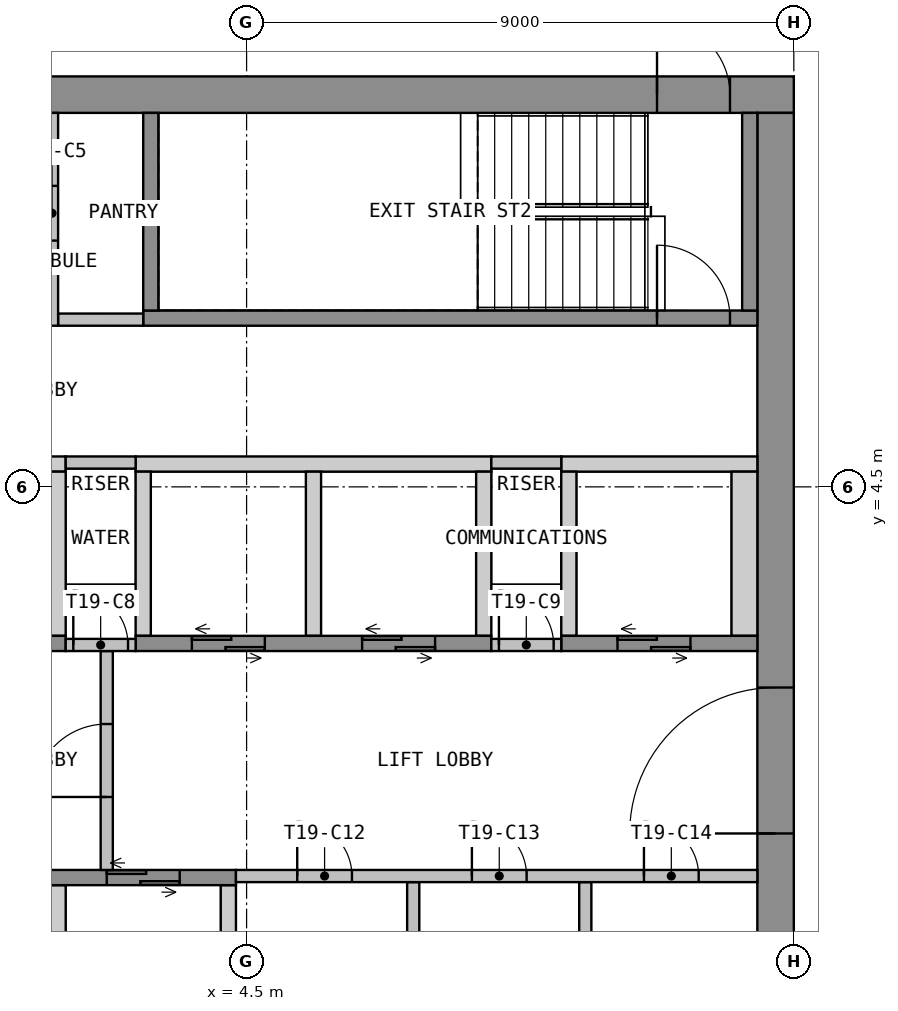
"""IFC4 building model, lengths in metres.
Left out: names, types, materials, properties, quantities, classifications, styles, units other than length and angle.
Written with IfcOpenShell. Run it as: python <this file> out.ifc"""

import sys

from ifc_helpers import new_model, si_unit, direction, frame, frame_2d, origin, place, context, subcontext, project, spatial, polyline, rectangle, outline, extrude, element, fill, save


model = new_model("IFC4")
c1 = context("Model", 3, precision=1e-05, world=origin(), true_north=direction((0.0, 1.0)))
c2 = subcontext(c1, "Body", "Model", "MODEL_VIEW")
j1 = project(units=[si_unit("LENGTHUNIT", "METRE"), si_unit("PLANEANGLEUNIT", "RADIAN")], contexts=[c1])
p1 = place(None, origin())
s1 = spatial("IfcSite", under=j1, at=p1, CompositionType="ELEMENT")
p2 = place(p1, origin())
s2 = spatial("IfcBuilding", under=s1, at=p2, CompositionType="ELEMENT")
p3 = place(p2, frame((0.0, 0.0, 258.6)))
s3 = spatial("IfcBuildingStorey", under=s2, at=p3, CompositionType="ELEMENT", Elevation=258.6)
p4 = place(p3, frame((-13.5, 10.95, 0.0), z_axis=(0.0, 0.0, 1.0), x_axis=(1.0, 0.0, 0.0)))
e1 = element("IfcWall", 1, at=p4, inside=s3, PredefinedType="SHEAR", context=c2, shape_type="SweptSolid", body=[
    extrude(rectangle(XDim=27.0, YDim=0.6, at=frame_2d((13.5, 0.0))), origin(), (0.0, 0.0, 1.0), 3.575),
])
p5 = place(p4, frame((12.3, 0.0, 0.0)))
e2 = element("IfcOpeningElement", 2, at=p5, cuts=e1, PredefinedType="OPENING", context=c2, shape_type="SweptSolid", body=[
    extrude(rectangle(XDim=2.4, YDim=2.1, at=frame_2d((1.2, 1.05))), frame((0.0, 0.31, 0.0), z_axis=(0.0, -1.0, 0.0), x_axis=(1.0, 0.0, 0.0)), (0.0, 0.0, 1.0), 0.62),
])
p6 = place(p4, frame((1.05, 0.0, 0.0)))
e3 = element("IfcOpeningElement", 3, at=p6, cuts=e1, PredefinedType="OPENING", context=c2, shape_type="SweptSolid", body=[
    extrude(rectangle(XDim=1.2, YDim=2.1, at=frame_2d((0.6, 1.05))), frame((0.0, 0.31, 0.0), z_axis=(0.0, -1.0, 0.0), x_axis=(1.0, 0.0, 0.0)), (0.0, 0.0, 1.0), 0.62),
])
p7 = place(p4, frame((24.75, 0.0, 0.0)))
e4 = element("IfcOpeningElement", 4, at=p7, cuts=e1, PredefinedType="OPENING", context=c2, shape_type="SweptSolid", body=[
    extrude(rectangle(XDim=1.2, YDim=2.1, at=frame_2d((0.6, 1.05))), frame((0.0, 0.31, 0.0), z_axis=(0.0, -1.0, 0.0), x_axis=(1.0, 0.0, 0.0)), (0.0, 0.0, 1.0), 0.62),
])
p8 = place(p3, frame((13.2, -10.65, 0.0), z_axis=(0.0, 0.0, 1.0), x_axis=(0.0, 1.0, 0.0)))
e5 = element("IfcWall", 5, at=p8, inside=s3, PredefinedType="SHEAR", context=c2, shape_type="SweptSolid", body=[
    extrude(rectangle(XDim=21.3, YDim=0.6, at=frame_2d((10.65, 0.0))), origin(), (0.0, 0.0, 1.0), 3.575),
])
p9 = place(p8, frame((9.45, 0.0, 0.0)))
e6 = element("IfcOpeningElement", 6, at=p9, cuts=e5, PredefinedType="OPENING", context=c2, shape_type="SweptSolid", body=[
    extrude(rectangle(XDim=2.4, YDim=2.1, at=frame_2d((1.2, 1.05))), frame((0.0, 0.31, 0.0), z_axis=(0.0, -1.0, 0.0), x_axis=(1.0, 0.0, 0.0)), (0.0, 0.0, 1.0), 0.62),
])
p10 = place(p3, origin())
e7 = element("IfcWall", 7, at=p10, inside=s3, PredefinedType="SHEAR", context=c2, shape_type="SweptSolid", body=[
    extrude(outline(polyline([(-1.525, 4.75), (1.525, 4.75), (1.525, 5.0), (-1.525, 5.0), (-1.525, 4.75)])), origin(), (0.0, 0.0, 1.0), 3.575),
])
p11 = place(p3, origin())
e8 = element("IfcWall", 8, at=p11, inside=s3, PredefinedType="SHEAR", context=c2, shape_type="SweptSolid", body=[
    extrude(outline(polyline([(2.675, 4.75), (8.525, 4.75), (8.525, 5.0), (2.675, 5.0), (2.675, 4.75)])), origin(), (0.0, 0.0, 1.0), 3.575),
])
p12 = place(p3, origin())
e9 = element("IfcWall", 9, at=p12, inside=s3, PredefinedType="SHEAR", context=c2, shape_type="SweptSolid", body=[
    extrude(outline(polyline([(9.675, 4.75), (12.9, 4.75), (12.9, 5.0), (9.675, 5.0), (9.675, 4.75)])), origin(), (0.0, 0.0, 1.0), 3.575),
])
p13 = place(p3, origin())
e10 = element("IfcWall", 10, at=p13, inside=s3, PredefinedType="SHEAR", context=c2, shape_type="SweptSolid", body=[
    extrude(outline(polyline([(1.275, 2.05), (1.525, 2.05), (1.525, 4.75), (1.275, 4.75), (1.275, 2.05)])), origin(), (0.0, 0.0, 1.0), 3.575),
])
p14 = place(p3, origin())
e11 = element("IfcWall", 11, at=p14, inside=s3, PredefinedType="SHEAR", context=c2, shape_type="SweptSolid", body=[
    extrude(outline(polyline([(2.675, 2.05), (2.925, 2.05), (2.925, 4.75), (2.675, 4.75), (2.675, 2.05)])), origin(), (0.0, 0.0, 1.0), 3.575),
])
p15 = place(p3, origin())
e12 = element("IfcWall", 12, at=p15, inside=s3, PredefinedType="SHEAR", context=c2, shape_type="SweptSolid", body=[
    extrude(outline(polyline([(5.475, 2.05), (5.725, 2.05), (5.725, 4.75), (5.475, 4.75), (5.475, 2.05)])), origin(), (0.0, 0.0, 1.0), 3.575),
])
p16 = place(p3, origin())
e13 = element("IfcWall", 13, at=p16, inside=s3, PredefinedType="SHEAR", context=c2, shape_type="SweptSolid", body=[
    extrude(outline(polyline([(8.275, 2.05), (8.525, 2.05), (8.525, 4.75), (8.275, 4.75), (8.275, 2.05)])), origin(), (0.0, 0.0, 1.0), 3.575),
])
p17 = place(p3, origin())
e14 = element("IfcWall", 14, at=p17, inside=s3, PredefinedType="SHEAR", context=c2, shape_type="SweptSolid", body=[
    extrude(outline(polyline([(9.675, 2.05), (9.925, 2.05), (9.925, 4.75), (9.675, 4.75), (9.675, 2.05)])), origin(), (0.0, 0.0, 1.0), 3.575),
])
p18 = place(p3, origin())
e15 = element("IfcWall", 15, at=p18, inside=s3, PredefinedType="SHEAR", context=c2, shape_type="SweptSolid", body=[
    extrude(outline(polyline([(12.475, 2.05), (12.9, 2.05), (12.9, 4.75), (12.475, 4.75), (12.475, 2.05)])), origin(), (0.0, 0.0, 1.0), 3.575),
])
p19 = place(p3, frame((-1.525, 1.925, 0.0), z_axis=(0.0, 0.0, 1.0), x_axis=(1.0, 0.0, 0.0)))
e16 = element("IfcWall", 16, at=p19, inside=s3, PredefinedType="SHEAR", context=c2, shape_type="SweptSolid", body=[
    extrude(rectangle(XDim=3.05, YDim=0.25, at=frame_2d((1.525, 0.0))), origin(), (0.0, 0.0, 1.0), 3.575),
])
p20 = place(p19, frame((0.925, 0.0, 0.0)))
e17 = element("IfcOpeningElement", 17, at=p20, cuts=e16, PredefinedType="OPENING", context=c2, shape_type="SweptSolid", body=[
    extrude(rectangle(XDim=1.2, YDim=2.1, at=frame_2d((0.6, 1.05))), frame((0.0, 0.135, 0.0), z_axis=(0.0, -1.0, 0.0), x_axis=(1.0, 0.0, 0.0)), (0.0, 0.0, 1.0), 0.27),
])
p21 = place(p3, frame((2.675, 1.925, 0.0), z_axis=(0.0, 0.0, 1.0), x_axis=(1.0, 0.0, 0.0)))
e18 = element("IfcWall", 18, at=p21, inside=s3, PredefinedType="SHEAR", context=c2, shape_type="SweptSolid", body=[
    extrude(rectangle(XDim=5.85, YDim=0.25, at=frame_2d((2.925, 0.0))), origin(), (0.0, 0.0, 1.0), 3.575),
])
p22 = place(p21, frame((0.925, 0.0, 0.0)))
e19 = element("IfcOpeningElement", 19, at=p22, cuts=e18, PredefinedType="OPENING", context=c2, shape_type="SweptSolid", body=[
    extrude(rectangle(XDim=1.2, YDim=2.1, at=frame_2d((0.6, 1.05))), frame((0.0, 0.135, 0.0), z_axis=(0.0, -1.0, 0.0), x_axis=(1.0, 0.0, 0.0)), (0.0, 0.0, 1.0), 0.27),
])
p23 = place(p21, frame((3.725, 0.0, 0.0)))
e20 = element("IfcOpeningElement", 20, at=p23, cuts=e18, PredefinedType="OPENING", context=c2, shape_type="SweptSolid", body=[
    extrude(rectangle(XDim=1.2, YDim=2.1, at=frame_2d((0.6, 1.05))), frame((0.0, 0.135, 0.0), z_axis=(0.0, -1.0, 0.0), x_axis=(1.0, 0.0, 0.0)), (0.0, 0.0, 1.0), 0.27),
])
p24 = place(p3, frame((9.675, 1.925, 0.0), z_axis=(0.0, 0.0, 1.0), x_axis=(1.0, 0.0, 0.0)))
e21 = element("IfcWall", 21, at=p24, inside=s3, PredefinedType="SHEAR", context=c2, shape_type="SweptSolid", body=[
    extrude(rectangle(XDim=3.225, YDim=0.25, at=frame_2d((1.612, 0.0))), origin(), (0.0, 0.0, 1.0), 3.575),
])
p25 = place(p24, frame((0.925, 0.0, 0.0)))
e22 = element("IfcOpeningElement", 22, at=p25, cuts=e21, PredefinedType="OPENING", context=c2, shape_type="SweptSolid", body=[
    extrude(rectangle(XDim=1.2, YDim=2.1, at=frame_2d((0.6, 1.05))), frame((0.0, 0.135, 0.0), z_axis=(0.0, -1.0, 0.0), x_axis=(1.0, 0.0, 0.0)), (0.0, 0.0, 1.0), 0.27),
])
p26 = place(p3, origin())
e23 = element("IfcWall", 23, at=p26, inside=s3, PredefinedType="SHEAR", context=c2, shape_type="SweptSolid", body=[
    extrude(outline(polyline([(1.275, -4.75), (1.525, -4.75), (1.525, -2.05), (1.275, -2.05), (1.275, -4.75)])), origin(), (0.0, 0.0, 1.0), 3.575),
])
p27 = place(p3, origin())
e24 = element("IfcWall", 24, at=p27, inside=s3, PredefinedType="SHEAR", context=c2, shape_type="SweptSolid", body=[
    extrude(outline(polyline([(4.075, -4.75), (4.325, -4.75), (4.325, -2.05), (4.075, -2.05), (4.075, -4.75)])), origin(), (0.0, 0.0, 1.0), 3.575),
])
p28 = place(p3, frame((-1.525, -1.925, 0.0), z_axis=(0.0, 0.0, 1.0), x_axis=(1.0, 0.0, 0.0)))
e25 = element("IfcWall", 25, at=p28, inside=s3, PredefinedType="SHEAR", context=c2, shape_type="SweptSolid", body=[
    extrude(rectangle(XDim=5.85, YDim=0.25, at=frame_2d((2.925, 0.0))), origin(), (0.0, 0.0, 1.0), 3.575),
])
p29 = place(p28, frame((0.925, 0.0, 0.0)))
e26 = element("IfcOpeningElement", 26, at=p29, cuts=e25, PredefinedType="OPENING", context=c2, shape_type="SweptSolid", body=[
    extrude(rectangle(XDim=1.2, YDim=2.1, at=frame_2d((0.6, 1.05))), frame((0.0, 0.135, 0.0), z_axis=(0.0, -1.0, 0.0), x_axis=(1.0, 0.0, 0.0)), (0.0, 0.0, 1.0), 0.27),
])
p30 = place(p28, frame((3.725, 0.0, 0.0)))
e27 = element("IfcOpeningElement", 27, at=p30, cuts=e25, PredefinedType="OPENING", context=c2, shape_type="SweptSolid", body=[
    extrude(rectangle(XDim=1.2, YDim=2.1, at=frame_2d((0.6, 1.05))), frame((0.0, 0.135, 0.0), z_axis=(0.0, -1.0, 0.0), x_axis=(1.0, 0.0, 0.0)), (0.0, 0.0, 1.0), 0.27),
])
p31 = place(p3, frame((2.2, -1.8, 0.0), z_axis=(0.0, 0.0, 1.0), x_axis=(0.0, 1.0, 0.0)))
e28 = element("IfcWall", 28, at=p31, inside=s3, PredefinedType="PARTITIONING", context=c2, shape_type="SweptSolid", body=[
    extrude(rectangle(XDim=3.6, YDim=0.2, at=frame_2d((1.8, 0.0))), origin(), (0.0, 0.0, 1.0), 3.575),
])
p32 = place(p31, frame((1.2, 0.0, 0.0)))
e29 = element("IfcOpeningElement", 29, at=p32, cuts=e28, PredefinedType="OPENING", context=c2, shape_type="SweptSolid", body=[
    extrude(rectangle(XDim=1.2, YDim=2.1, at=frame_2d((0.6, 1.05))), frame((0.0, 0.11, 0.0), z_axis=(0.0, -1.0, 0.0), x_axis=(1.0, 0.0, 0.0)), (0.0, 0.0, 1.0), 0.22),
])
p33 = place(p3, frame((2.8, 7.275, 0.0), z_axis=(0.0, 0.0, 1.0), x_axis=(1.0, 0.0, 0.0)))
e30 = element("IfcWall", 30, at=p33, inside=s3, PredefinedType="SHEAR", context=c2, shape_type="SweptSolid", body=[
    extrude(rectangle(XDim=10.1, YDim=0.25, at=frame_2d((5.05, 0.0))), origin(), (0.0, 0.0, 1.0), 3.575),
])
p34 = place(p33, frame((8.45, 0.0, 0.0)))
e31 = element("IfcOpeningElement", 31, at=p34, cuts=e30, PredefinedType="OPENING", context=c2, shape_type="SweptSolid", body=[
    extrude(rectangle(XDim=1.2, YDim=2.1, at=frame_2d((0.6, 1.05))), frame((0.0, 0.135, 0.0), z_axis=(0.0, -1.0, 0.0), x_axis=(1.0, 0.0, 0.0)), (0.0, 0.0, 1.0), 0.27),
])
for number, where, z_axis, x_axis in (
    (32, (2.925, 7.4, 0.0), (0.0, 0.0, 1.0), (0.0, 1.0, 0.0)),
    (33, (12.775, 7.4, 0.0), (0.0, 0.0, 1.0), (0.0, 1.0, 0.0)),
):
    element("IfcWall", number, at=place(p3, frame(where, z_axis=z_axis, x_axis=x_axis)), inside=s3, PredefinedType="SHEAR", context=c2, shape_type="SweptSolid", body=[
        extrude(rectangle(XDim=3.25, YDim=0.25, at=frame_2d((1.625, 0.0))), origin(), (0.0, 0.0, 1.0), 3.575),
    ])
p35 = place(p3, frame((1.4, 7.25, 0.0), z_axis=(0.0, 0.0, 1.0), x_axis=(1.0, 0.0, 0.0)))
e34 = element("IfcWall", 34, at=p35, inside=s3, PredefinedType="PARTITIONING", context=c2, shape_type="SweptSolid", body=[
    extrude(rectangle(XDim=1.4, YDim=0.2, at=frame_2d((0.7, 0.0))), origin(), (0.0, 0.0, 1.0), 3.575),
])
p36 = place(p3, frame((1.3, 7.15, 0.0), z_axis=(0.0, 0.0, 1.0), x_axis=(0.0, 1.0, 0.0)))
e35 = element("IfcWall", 35, at=p36, inside=s3, PredefinedType="PARTITIONING", context=c2, shape_type="SweptSolid", body=[
    extrude(rectangle(XDim=3.5, YDim=0.2, at=frame_2d((1.75, 0.0))), origin(), (0.0, 0.0, 1.0), 3.575),
])
p37 = place(p36, frame((1.4, 0.0, 0.0)))
e36 = element("IfcOpeningElement", 36, at=p37, cuts=e35, PredefinedType="OPENING", context=c2, shape_type="SweptSolid", body=[
    extrude(rectangle(XDim=0.9, YDim=2.1, at=frame_2d((0.45, 1.05))), frame((0.0, 0.11, 0.0), z_axis=(0.0, -1.0, 0.0), x_axis=(1.0, 0.0, 0.0)), (0.0, 0.0, 1.0), 0.22),
])
p38 = place(p3, frame((1.525, 1.9, 0.0), z_axis=(0.0, 0.0, 1.0), x_axis=(1.0, 0.0, 0.0)))
e37 = element("IfcWall", 37, at=p38, inside=s3, PredefinedType="PARTITIONING", context=c2, shape_type="SweptSolid", body=[
    extrude(rectangle(XDim=1.15, YDim=0.2, at=frame_2d((0.575, 0.0))), origin(), (0.0, 0.0, 1.0), 3.575),
])
p39 = place(p38, frame((0.125, 0.0, 0.0)))
e38 = element("IfcOpeningElement", 38, at=p39, cuts=e37, PredefinedType="OPENING", context=c2, shape_type="SweptSolid", body=[
    extrude(rectangle(XDim=0.9, YDim=2.1, at=frame_2d((0.45, 1.05))), frame((0.0, 0.11, 0.0), z_axis=(0.0, -1.0, 0.0), x_axis=(1.0, 0.0, 0.0)), (0.0, 0.0, 1.0), 0.22),
])
p40 = place(p3, frame((1.525, 4.9, 0.0), z_axis=(0.0, 0.0, 1.0), x_axis=(1.0, 0.0, 0.0)))
e39 = element("IfcWall", 39, at=p40, inside=s3, PredefinedType="PARTITIONING", context=c2, shape_type="SweptSolid", body=[
    extrude(rectangle(XDim=1.15, YDim=0.2, at=frame_2d((0.575, 0.0))), origin(), (0.0, 0.0, 1.0), 3.575),
])
p41 = place(p3, frame((8.525, 1.9, 0.0), z_axis=(0.0, 0.0, 1.0), x_axis=(1.0, 0.0, 0.0)))
e40 = element("IfcWall", 40, at=p41, inside=s3, PredefinedType="PARTITIONING", context=c2, shape_type="SweptSolid", body=[
    extrude(rectangle(XDim=1.15, YDim=0.2, at=frame_2d((0.575, 0.0))), origin(), (0.0, 0.0, 1.0), 3.575),
])
p42 = place(p41, frame((0.125, 0.0, 0.0)))
e41 = element("IfcOpeningElement", 41, at=p42, cuts=e40, PredefinedType="OPENING", context=c2, shape_type="SweptSolid", body=[
    extrude(rectangle(XDim=0.9, YDim=2.1, at=frame_2d((0.45, 1.05))), frame((0.0, 0.11, 0.0), z_axis=(0.0, -1.0, 0.0), x_axis=(1.0, 0.0, 0.0)), (0.0, 0.0, 1.0), 0.22),
])
p43 = place(p3, frame((8.525, 4.9, 0.0), z_axis=(0.0, 0.0, 1.0), x_axis=(1.0, 0.0, 0.0)))
e42 = element("IfcWall", 42, at=p43, inside=s3, PredefinedType="PARTITIONING", context=c2, shape_type="SweptSolid", body=[
    extrude(rectangle(XDim=1.15, YDim=0.2, at=frame_2d((0.575, 0.0))), origin(), (0.0, 0.0, 1.0), 3.575),
])
for number, where, z_axis, x_axis in (
    (43, (7.24, -4.8, 0.0), (0.0, 0.0, 1.0), (0.0, 1.0, 0.0)),
    (44, (10.07, -4.8, 0.0), (0.0, 0.0, 1.0), (0.0, 1.0, 0.0)),
):
    element("IfcWall", number, at=place(p3, frame(where, z_axis=z_axis, x_axis=x_axis)), inside=s3, PredefinedType="PARTITIONING", context=c2, shape_type="SweptSolid", body=[
        extrude(rectangle(XDim=2.8, YDim=0.2, at=frame_2d((1.4, 0.0))), origin(), (0.0, 0.0, 1.0), 3.575),
    ])
p44 = place(p3, frame((4.325, -1.9, 0.0), z_axis=(0.0, 0.0, 1.0), x_axis=(1.0, 0.0, 0.0)))
e45 = element("IfcWall", 45, at=p44, inside=s3, PredefinedType="PARTITIONING", context=c2, shape_type="SweptSolid", body=[
    extrude(rectangle(XDim=8.575, YDim=0.2, at=frame_2d((4.288, 0.0))), origin(), (0.0, 0.0, 1.0), 3.575),
])
p45 = place(p44, frame((1.008, 0.0, 0.0)))
e46 = element("IfcOpeningElement", 46, at=p45, cuts=e45, PredefinedType="OPENING", context=c2, shape_type="SweptSolid", body=[
    extrude(rectangle(XDim=0.9, YDim=2.1, at=frame_2d((0.45, 1.05))), frame((0.0, 0.11, 0.0), z_axis=(0.0, -1.0, 0.0), x_axis=(1.0, 0.0, 0.0)), (0.0, 0.0, 1.0), 0.22),
])
p46 = place(p44, frame((3.88, 0.0, 0.0)))
e47 = element("IfcOpeningElement", 47, at=p46, cuts=e45, PredefinedType="OPENING", context=c2, shape_type="SweptSolid", body=[
    extrude(rectangle(XDim=0.9, YDim=2.1, at=frame_2d((0.45, 1.05))), frame((0.0, 0.11, 0.0), z_axis=(0.0, -1.0, 0.0), x_axis=(1.0, 0.0, 0.0)), (0.0, 0.0, 1.0), 0.22),
])
p47 = place(p44, frame((6.71, 0.0, 0.0)))
e48 = element("IfcOpeningElement", 48, at=p47, cuts=e45, PredefinedType="OPENING", context=c2, shape_type="SweptSolid", body=[
    extrude(rectangle(XDim=0.9, YDim=2.1, at=frame_2d((0.45, 1.05))), frame((0.0, 0.11, 0.0), z_axis=(0.0, -1.0, 0.0), x_axis=(1.0, 0.0, 0.0)), (0.0, 0.0, 1.0), 0.22),
])
p48 = place(p9, origin())
e49 = element("IfcDoor", 49, at=p48, inside=s3, OperationType="DOUBLE_DOOR_DOUBLE_SWING", PredefinedType="DOOR", context=c2, shape_type="SweptSolid", body=[
    extrude(rectangle(XDim=2.4, YDim=2.1, at=frame_2d((1.2, 1.05))), frame((0.0, 0.025, 0.0), z_axis=(0.0, -1.0, 0.0), x_axis=(1.0, 0.0, 0.0)), (0.0, 0.0, 1.0), 0.05),
])
fill(e6, e49)
p49 = place(p7, origin())
e50 = element("IfcDoor", 50, at=p49, inside=s3, OperationType="SINGLE_SWING_RIGHT", PredefinedType="DOOR", context=c2, shape_type="SweptSolid", body=[
    extrude(rectangle(XDim=1.2, YDim=2.1, at=frame_2d((0.6, 1.05))), frame((0.0, 0.025, 0.0), z_axis=(0.0, -1.0, 0.0), x_axis=(1.0, 0.0, 0.0)), (0.0, 0.0, 1.0), 0.05),
])
fill(e4, e50)
p50 = place(p22, origin())
e51 = element("IfcDoor", 51, at=p50, inside=s3, OperationType="DOUBLE_DOOR_SLIDING", PredefinedType="DOOR", context=c2, shape_type="SweptSolid", body=[
    extrude(rectangle(XDim=1.2, YDim=2.1, at=frame_2d((0.6, 1.05))), frame((0.0, 0.025, 0.0), z_axis=(0.0, -1.0, 0.0), x_axis=(1.0, 0.0, 0.0)), (0.0, 0.0, 1.0), 0.05),
])
fill(e19, e51)
p51 = place(p23, origin())
e52 = element("IfcDoor", 52, at=p51, inside=s3, OperationType="DOUBLE_DOOR_SLIDING", PredefinedType="DOOR", context=c2, shape_type="SweptSolid", body=[
    extrude(rectangle(XDim=1.2, YDim=2.1, at=frame_2d((0.6, 1.05))), frame((0.0, 0.025, 0.0), z_axis=(0.0, -1.0, 0.0), x_axis=(1.0, 0.0, 0.0)), (0.0, 0.0, 1.0), 0.05),
])
fill(e20, e52)
p52 = place(p25, origin())
e53 = element("IfcDoor", 53, at=p52, inside=s3, OperationType="DOUBLE_DOOR_SLIDING", PredefinedType="DOOR", context=c2, shape_type="SweptSolid", body=[
    extrude(rectangle(XDim=1.2, YDim=2.1, at=frame_2d((0.6, 1.05))), frame((0.0, 0.025, 0.0), z_axis=(0.0, -1.0, 0.0), x_axis=(1.0, 0.0, 0.0)), (0.0, 0.0, 1.0), 0.05),
])
fill(e22, e53)
p53 = place(p30, origin())
e54 = element("IfcDoor", 54, at=p53, inside=s3, OperationType="DOUBLE_DOOR_SLIDING", PredefinedType="DOOR", context=c2, shape_type="SweptSolid", body=[
    extrude(rectangle(XDim=1.2, YDim=2.1, at=frame_2d((0.6, 1.05))), frame((0.0, 0.025, 0.0), z_axis=(0.0, -1.0, 0.0), x_axis=(1.0, 0.0, 0.0)), (0.0, 0.0, 1.0), 0.05),
])
fill(e27, e54)
p54 = place(p32, origin())
e55 = element("IfcDoor", 55, at=p54, inside=s3, OperationType="SINGLE_SWING_LEFT", PredefinedType="DOOR", context=c2, shape_type="SweptSolid", body=[
    extrude(rectangle(XDim=1.2, YDim=2.1, at=frame_2d((0.6, 1.05))), frame((0.0, 0.025, 0.0), z_axis=(0.0, -1.0, 0.0), x_axis=(1.0, 0.0, 0.0)), (0.0, 0.0, 1.0), 0.05),
])
fill(e29, e55)
p55 = place(p34, origin())
e56 = element("IfcDoor", 56, at=p55, inside=s3, OperationType="SINGLE_SWING_LEFT", PredefinedType="DOOR", context=c2, shape_type="SweptSolid", body=[
    extrude(rectangle(XDim=1.2, YDim=2.1, at=frame_2d((0.6, 1.05))), frame((0.0, 0.025, 0.0), z_axis=(0.0, -1.0, 0.0), x_axis=(1.0, 0.0, 0.0)), (0.0, 0.0, 1.0), 0.05),
])
fill(e31, e56)
p56 = place(p37, origin())
e57 = element("IfcDoor", 57, at=p56, inside=s3, OperationType="SINGLE_SWING_LEFT", PredefinedType="DOOR", context=c2, shape_type="SweptSolid", body=[
    extrude(rectangle(XDim=0.9, YDim=2.1, at=frame_2d((0.45, 1.05))), frame((0.0, 0.025, 0.0), z_axis=(0.0, -1.0, 0.0), x_axis=(1.0, 0.0, 0.0)), (0.0, 0.0, 1.0), 0.05),
])
fill(e36, e57)
p57 = place(p39, origin())
e58 = element("IfcDoor", 58, at=p57, inside=s3, OperationType="SINGLE_SWING_LEFT", PredefinedType="DOOR", context=c2, shape_type="SweptSolid", body=[
    extrude(rectangle(XDim=0.9, YDim=2.1, at=frame_2d((0.45, 1.05))), frame((0.0, 0.025, 0.0), z_axis=(0.0, -1.0, 0.0), x_axis=(1.0, 0.0, 0.0)), (0.0, 0.0, 1.0), 0.05),
])
fill(e38, e58)
p58 = place(p42, origin())
e59 = element("IfcDoor", 59, at=p58, inside=s3, OperationType="SINGLE_SWING_LEFT", PredefinedType="DOOR", context=c2, shape_type="SweptSolid", body=[
    extrude(rectangle(XDim=0.9, YDim=2.1, at=frame_2d((0.45, 1.05))), frame((0.0, 0.025, 0.0), z_axis=(0.0, -1.0, 0.0), x_axis=(1.0, 0.0, 0.0)), (0.0, 0.0, 1.0), 0.05),
])
fill(e41, e59)
p59 = place(p45, origin())
e60 = element("IfcDoor", 60, at=p59, inside=s3, OperationType="SINGLE_SWING_LEFT", PredefinedType="DOOR", context=c2, shape_type="SweptSolid", body=[
    extrude(rectangle(XDim=0.9, YDim=2.1, at=frame_2d((0.45, 1.05))), frame((0.0, 0.025, 0.0), z_axis=(0.0, -1.0, 0.0), x_axis=(1.0, 0.0, 0.0)), (0.0, 0.0, 1.0), 0.05),
])
fill(e46, e60)
p60 = place(p46, origin())
e61 = element("IfcDoor", 61, at=p60, inside=s3, OperationType="SINGLE_SWING_LEFT", PredefinedType="DOOR", context=c2, shape_type="SweptSolid", body=[
    extrude(rectangle(XDim=0.9, YDim=2.1, at=frame_2d((0.45, 1.05))), frame((0.0, 0.025, 0.0), z_axis=(0.0, -1.0, 0.0), x_axis=(1.0, 0.0, 0.0)), (0.0, 0.0, 1.0), 0.05),
])
fill(e47, e61)
p61 = place(p47, origin())
e62 = element("IfcDoor", 62, at=p61, inside=s3, OperationType="SINGLE_SWING_LEFT", PredefinedType="DOOR", context=c2, shape_type="SweptSolid", body=[
    extrude(rectangle(XDim=0.9, YDim=2.1, at=frame_2d((0.45, 1.05))), frame((0.0, 0.025, 0.0), z_axis=(0.0, -1.0, 0.0), x_axis=(1.0, 0.0, 0.0)), (0.0, 0.0, 1.0), 0.05),
])
fill(e48, e62)
save(model, sys.argv[1])
